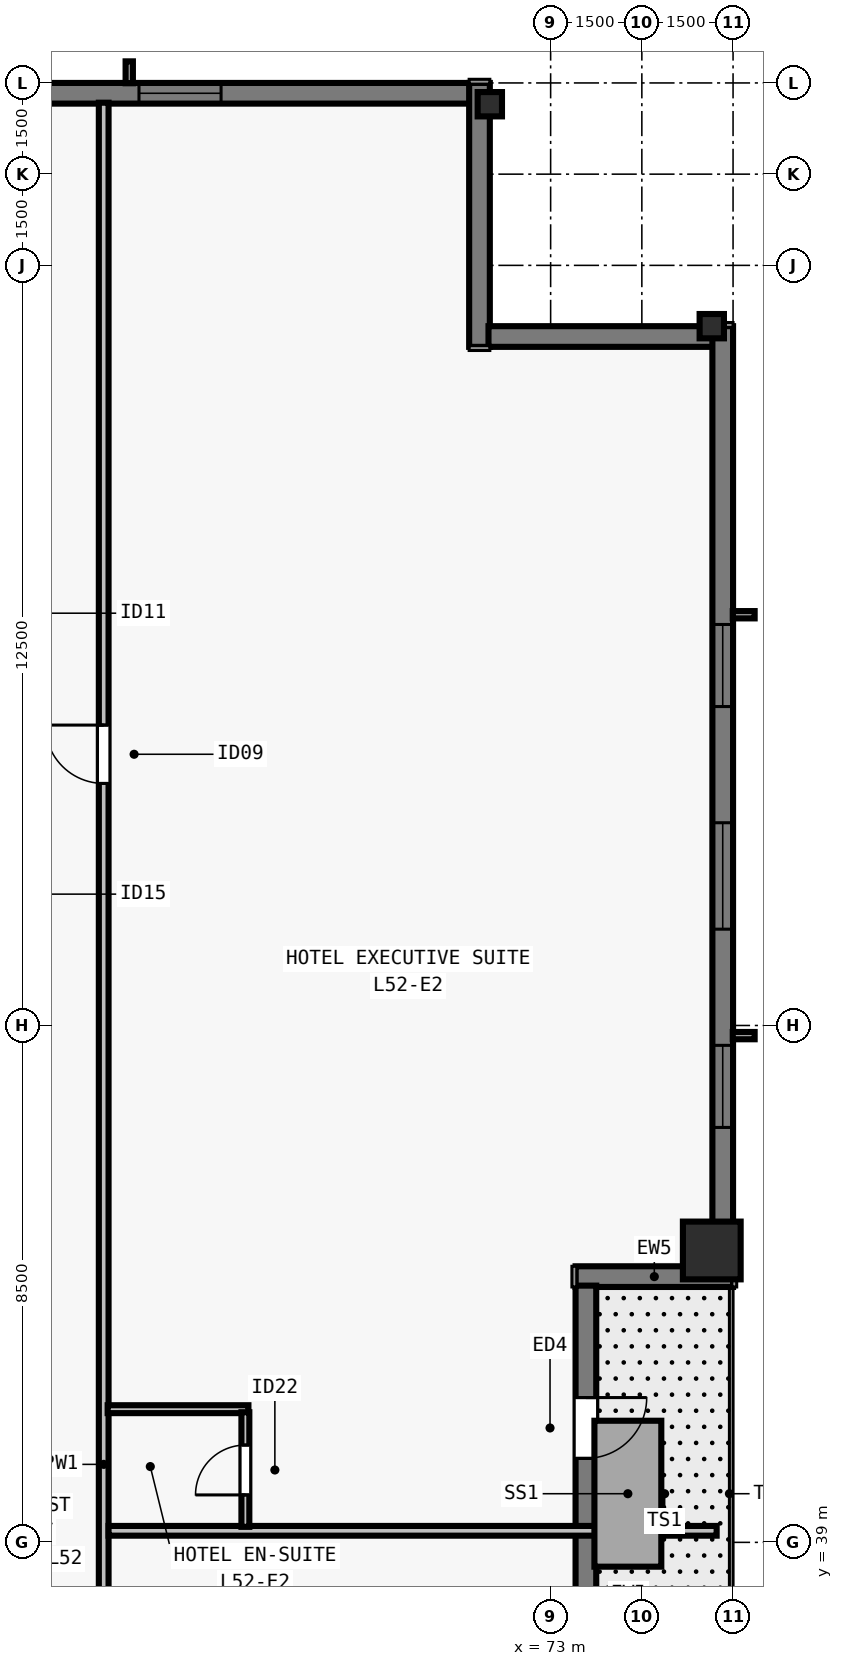
"""IFC4 building model, lengths in metres.
Left out: names, types, materials, properties, quantities, classifications, styles, units other than length and angle.
Written with IfcOpenShell. Run it as: python <this file> out.ifc"""

import sys

from ifc_helpers import new_model, si_unit, direction, frame, frame_2d, origin, origin_2d, place, context, subcontext, project, spatial, rectangle, i_section, extrude, element, fill, save


model = new_model("IFC4")
c1 = context("Model", 3, precision=1e-05, world=origin(), true_north=direction((0.0, 1.0)))
c2 = subcontext(c1, "Body", "Model", "MODEL_VIEW")
j1 = project(units=[si_unit("LENGTHUNIT", "METRE"), si_unit("PLANEANGLEUNIT", "RADIAN")], contexts=[c1])
p1 = place(None, origin())
s1 = spatial("IfcSite", under=j1, at=p1, CompositionType="ELEMENT")
p2 = place(p1, origin())
s2 = spatial("IfcBuilding", under=s1, at=p2, CompositionType="ELEMENT")
p3 = place(p2, frame((0.0, 0.0, 190.0)))
s3 = spatial("IfcBuildingStorey", under=s2, at=p3, CompositionType="ELEMENT", Elevation=190.0)
p4 = place(p3, frame((75.65, 43.8, 0.0), z_axis=(0.0, 0.0, 1.0), x_axis=(0.0, 1.0, 0.0)))
e1 = element("IfcColumn", 1, at=p4, inside=s3, PredefinedType="COLUMN", context=c2, shape_type="SweptSolid", body=[
    extrude(rectangle(XDim=0.95, YDim=0.95, at=origin_2d()), origin(), (0.0, 0.0, 1.0), 3.5),
])
for number, where, z_axis, x_axis in (
    (2, (75.65, 59.0, 0.0), (0.0, 0.0, 1.0), (0.0, 1.0, 0.0)),
    (3, (72.0, 62.65, 0.0), (0.0, 0.0, 1.0), (1.0, 0.0, 0.0)),
):
    element("IfcColumn", number, at=place(p3, frame(where, z_axis=z_axis, x_axis=x_axis)), inside=s3, PredefinedType="COLUMN", context=c2, shape_type="SweptSolid", body=[
        extrude(i_section(OverallWidth=0.4, OverallDepth=0.4, WebThickness=0.022, FlangeThickness=0.036, at=origin_2d()), origin(), (0.0, 0.0, 1.0), 3.5),
    ])
p5 = place(p3, frame((32.0, 62.83, 0.0), z_axis=(0.0, 0.0, 1.0), x_axis=(1.0, 0.0, 0.0)))
e4 = element("IfcWall", 4, at=p5, inside=s3, PredefinedType="SOLIDWALL", context=c2, shape_type="SweptSolid", body=[
    extrude(rectangle(XDim=39.682, YDim=0.34, at=frame_2d((19.841, 0.0))), origin(), (0.0, 0.0, 1.0), 3.24),
])
p6 = place(p5, frame((4.952, 0.0, 0.8)))
e5 = element("IfcOpeningElement", 5, at=p6, cuts=e4, PredefinedType="OPENING", context=c2, shape_type="SweptSolid", body=[
    extrude(rectangle(XDim=1.35, YDim=1.62, at=frame_2d((0.675, 0.81))), frame((0.0, 0.18, 0.0), z_axis=(0.0, -1.0, 0.0), x_axis=(1.0, 0.0, 0.0)), (0.0, 0.0, 1.0), 0.36),
])
p7 = place(p5, frame((12.059, 0.0, 0.8)))
e6 = element("IfcOpeningElement", 6, at=p7, cuts=e4, PredefinedType="OPENING", context=c2, shape_type="SweptSolid", body=[
    extrude(rectangle(XDim=1.35, YDim=1.62, at=frame_2d((0.675, 0.81))), frame((0.0, 0.18, 0.0), z_axis=(0.0, -1.0, 0.0), x_axis=(1.0, 0.0, 0.0)), (0.0, 0.0, 1.0), 0.36),
])
p8 = place(p5, frame((16.262, 0.0, 0.8)))
e7 = element("IfcOpeningElement", 7, at=p8, cuts=e4, PredefinedType="OPENING", context=c2, shape_type="SweptSolid", body=[
    extrude(rectangle(XDim=1.75, YDim=1.62, at=frame_2d((0.875, 0.81))), frame((0.0, 0.18, 0.0), z_axis=(0.0, -1.0, 0.0), x_axis=(1.0, 0.0, 0.0)), (0.0, 0.0, 1.0), 0.36),
])
p9 = place(p5, frame((19.166, 0.0, 0.8)))
e8 = element("IfcOpeningElement", 8, at=p9, cuts=e4, PredefinedType="OPENING", context=c2, shape_type="SweptSolid", body=[
    extrude(rectangle(XDim=1.35, YDim=1.62, at=frame_2d((0.675, 0.81))), frame((0.0, 0.18, 0.0), z_axis=(0.0, -1.0, 0.0), x_axis=(1.0, 0.0, 0.0)), (0.0, 0.0, 1.0), 0.36),
])
p10 = place(p5, frame((22.07, 0.0, 0.8)))
e9 = element("IfcOpeningElement", 9, at=p10, cuts=e4, PredefinedType="OPENING", context=c2, shape_type="SweptSolid", body=[
    extrude(rectangle(XDim=1.75, YDim=1.62, at=frame_2d((0.875, 0.81))), frame((0.0, 0.18, 0.0), z_axis=(0.0, -1.0, 0.0), x_axis=(1.0, 0.0, 0.0)), (0.0, 0.0, 1.0), 0.36),
])
p11 = place(p5, frame((26.273, 0.0, 0.8)))
e10 = element("IfcOpeningElement", 10, at=p11, cuts=e4, PredefinedType="OPENING", context=c2, shape_type="SweptSolid", body=[
    extrude(rectangle(XDim=1.35, YDim=1.62, at=frame_2d((0.675, 0.81))), frame((0.0, 0.18, 0.0), z_axis=(0.0, -1.0, 0.0), x_axis=(1.0, 0.0, 0.0)), (0.0, 0.0, 1.0), 0.36),
])
p12 = place(p5, frame((29.177, 0.0, 0.8)))
e11 = element("IfcOpeningElement", 11, at=p12, cuts=e4, PredefinedType="OPENING", context=c2, shape_type="SweptSolid", body=[
    extrude(rectangle(XDim=1.75, YDim=1.62, at=frame_2d((0.875, 0.81))), frame((0.0, 0.18, 0.0), z_axis=(0.0, -1.0, 0.0), x_axis=(1.0, 0.0, 0.0)), (0.0, 0.0, 1.0), 0.36),
])
p13 = place(p5, frame((34.23, 0.0, 0.8)))
e12 = element("IfcOpeningElement", 12, at=p13, cuts=e4, PredefinedType="OPENING", context=c2, shape_type="SweptSolid", body=[
    extrude(rectangle(XDim=1.35, YDim=1.62, at=frame_2d((0.675, 0.81))), frame((0.0, 0.18, 0.0), z_axis=(0.0, -1.0, 0.0), x_axis=(1.0, 0.0, 0.0)), (0.0, 0.0, 1.0), 0.36),
])
p14 = place(p3, frame((71.83, 63.0, 0.0), z_axis=(0.0, 0.0, 1.0), x_axis=(0.0, -1.0, 0.0)))
e13 = element("IfcWall", 13, at=p14, inside=s3, PredefinedType="SOLIDWALL", context=c2, shape_type="SweptSolid", body=[
    extrude(rectangle(XDim=4.34, YDim=0.34, at=frame_2d((2.17, 0.0))), origin(), (0.0, 0.0, 1.0), 3.24),
])
p15 = place(p3, frame((71.978, 58.83, 0.0), z_axis=(0.0, 0.0, 1.0), x_axis=(1.0, 0.0, 0.0)))
e14 = element("IfcWall", 14, at=p15, inside=s3, PredefinedType="SOLIDWALL", context=c2, shape_type="SweptSolid", body=[
    extrude(rectangle(XDim=3.704, YDim=0.34, at=frame_2d((1.852, 0.0))), origin(), (0.0, 0.0, 1.0), 3.24),
])
p16 = place(p3, frame((75.83, 59.0, 0.0), z_axis=(0.0, 0.0, 1.0), x_axis=(0.0, -1.0, 0.0)))
e15 = element("IfcWall", 15, at=p16, inside=s3, PredefinedType="SOLIDWALL", context=c2, shape_type="SweptSolid", body=[
    extrude(rectangle(XDim=15.482, YDim=0.34, at=frame_2d((7.741, 0.0))), origin(), (0.0, 0.0, 1.0), 3.24),
])
p17 = place(p16, frame((4.905, 0.0, 0.8)))
e16 = element("IfcOpeningElement", 16, at=p17, cuts=e15, PredefinedType="OPENING", context=c2, shape_type="SweptSolid", body=[
    extrude(rectangle(XDim=1.35, YDim=1.62, at=frame_2d((0.675, 0.81))), frame((0.0, 0.18, 0.0), z_axis=(0.0, -1.0, 0.0), x_axis=(1.0, 0.0, 0.0)), (0.0, 0.0, 1.0), 0.36),
])
p18 = place(p16, frame((8.166, 0.0, 0.8)))
e17 = element("IfcOpeningElement", 17, at=p18, cuts=e15, PredefinedType="OPENING", context=c2, shape_type="SweptSolid", body=[
    extrude(rectangle(XDim=1.75, YDim=1.62, at=frame_2d((0.875, 0.81))), frame((0.0, 0.18, 0.0), z_axis=(0.0, -1.0, 0.0), x_axis=(1.0, 0.0, 0.0)), (0.0, 0.0, 1.0), 0.36),
])
p19 = place(p16, frame((11.827, 0.0, 0.8)))
e18 = element("IfcOpeningElement", 18, at=p19, cuts=e15, PredefinedType="OPENING", context=c2, shape_type="SweptSolid", body=[
    extrude(rectangle(XDim=1.35, YDim=1.62, at=frame_2d((0.675, 0.81))), frame((0.0, 0.18, 0.0), z_axis=(0.0, -1.0, 0.0), x_axis=(1.0, 0.0, 0.0)), (0.0, 0.0, 1.0), 0.36),
])
p20 = place(p3, frame((76.0, 43.37, 0.0), z_axis=(0.0, 0.0, 1.0), x_axis=(-1.0, 0.0, 0.0)))
e19 = element("IfcWall", 19, at=p20, inside=s3, PredefinedType="SOLIDWALL", context=c2, shape_type="SweptSolid", body=[
    extrude(rectangle(XDim=2.59, YDim=0.34, at=frame_2d((1.295, 0.0))), origin(), (0.0, 0.0, 1.0), 3.24),
])
p21 = place(p3, frame((73.58, 43.222, 0.0), z_axis=(0.0, 0.0, 1.0), x_axis=(0.0, -1.0, 0.0)))
e20 = element("IfcWall", 20, at=p21, inside=s3, PredefinedType="SOLIDWALL", context=c2, shape_type="SweptSolid", body=[
    extrude(rectangle(XDim=7.162, YDim=0.34, at=frame_2d((3.581, 0.0))), origin(), (0.0, 0.0, 1.0), 3.24),
])
p22 = place(p21, frame((1.841, 0.0, 0.0)))
e21 = element("IfcOpeningElement", 21, at=p22, cuts=e20, PredefinedType="OPENING", context=c2, shape_type="SweptSolid", body=[
    extrude(rectangle(XDim=1.0, YDim=2.15, at=frame_2d((0.5, 1.075))), frame((0.0, 0.18, 0.0), z_axis=(0.0, -1.0, 0.0), x_axis=(1.0, 0.0, 0.0)), (0.0, 0.0, 1.0), 0.36),
])
p23 = place(p3, frame((65.65, 15.325, 0.0), z_axis=(0.0, 0.0, 1.0), x_axis=(0.0, 1.0, 0.0)))
e22 = element("IfcWall", 22, at=p23, inside=s3, PredefinedType="PARTITIONING", context=c2, shape_type="SweptSolid", body=[
    extrude(rectangle(XDim=47.35, YDim=0.16, at=frame_2d((23.675, 0.0))), origin(), (0.0, 0.0, 1.0), 2.515),
])
p24 = place(p23, frame((12.8, 0.0, 0.0)))
e23 = element("IfcOpeningElement", 23, at=p24, cuts=e22, PredefinedType="OPENING", context=c2, shape_type="SweptSolid", body=[
    extrude(rectangle(XDim=0.96, YDim=2.15, at=frame_2d((0.48, 1.075))), frame((0.0, 0.09, 0.0), z_axis=(0.0, -1.0, 0.0), x_axis=(1.0, 0.0, 0.0)), (0.0, 0.0, 1.0), 0.18),
])
p25 = place(p23, frame((36.155, 0.0, 0.0)))
e24 = element("IfcOpeningElement", 24, at=p25, cuts=e22, PredefinedType="OPENING", context=c2, shape_type="SweptSolid", body=[
    extrude(rectangle(XDim=0.96, YDim=2.15, at=frame_2d((0.48, 1.075))), frame((0.0, 0.09, 0.0), z_axis=(0.0, -1.0, 0.0), x_axis=(1.0, 0.0, 0.0)), (0.0, 0.0, 1.0), 0.18),
])
p26 = place(p3, frame((65.73, 39.19, 0.0), z_axis=(0.0, 0.0, 1.0), x_axis=(1.0, 0.0, 0.0)))
e25 = element("IfcWall", 25, at=p26, inside=s3, PredefinedType="PARTITIONING", context=c2, shape_type="SweptSolid", body=[
    extrude(rectangle(XDim=10.0, YDim=0.16, at=frame_2d((5.0, 0.0))), origin(), (0.0, 0.0, 1.0), 3.24),
])
p27 = place(p3, frame((65.715, 41.19, 0.0), z_axis=(0.0, 0.0, 1.0), x_axis=(1.0, 0.0, 0.0)))
e26 = element("IfcWall", 26, at=p27, inside=s3, PredefinedType="PLUMBINGWALL", context=c2, shape_type="SweptSolid", body=[
    extrude(rectangle(XDim=2.315, YDim=0.13, at=frame_2d((1.157, 0.0))), origin(), (0.0, 0.0, 1.0), 3.24),
])
p28 = place(p3, frame((67.98, 39.255, 0.0), z_axis=(0.0, 0.0, 1.0), x_axis=(0.0, 1.0, 0.0)))
e27 = element("IfcWall", 27, at=p28, inside=s3, PredefinedType="PLUMBINGWALL", context=c2, shape_type="SweptSolid", body=[
    extrude(rectangle(XDim=1.885, YDim=0.13, at=frame_2d((0.942, 0.0))), origin(), (0.0, 0.0, 1.0), 3.24),
])
p29 = place(p28, frame((0.525, 0.0, 0.0)))
e28 = element("IfcOpeningElement", 28, at=p29, cuts=e27, PredefinedType="OPENING", context=c2, shape_type="SweptSolid", body=[
    extrude(rectangle(XDim=0.82, YDim=2.1, at=frame_2d((0.41, 1.05))), frame((0.0, 0.075, 0.0), z_axis=(0.0, -1.0, 0.0), x_axis=(1.0, 0.0, 0.0)), (0.0, 0.0, 1.0), 0.15),
])
p30 = place(p13, origin())
e29 = element("IfcWindow", 29, at=p30, inside=s3, PartitioningType="SINGLE_PANEL", PredefinedType="WINDOW", context=c2, shape_type="SweptSolid", body=[
    extrude(rectangle(XDim=1.35, YDim=1.62, at=frame_2d((0.675, 0.81))), frame((0.0, -0.05, 0.0), z_axis=(0.0, -1.0, 0.0), x_axis=(1.0, 0.0, 0.0)), (0.0, 0.0, 1.0), 0.06),
])
fill(e12, e29)
p31 = place(p17, origin())
e30 = element("IfcWindow", 30, at=p31, inside=s3, PartitioningType="SINGLE_PANEL", PredefinedType="WINDOW", context=c2, shape_type="SweptSolid", body=[
    extrude(rectangle(XDim=1.35, YDim=1.62, at=frame_2d((0.675, 0.81))), frame((0.0, -0.05, 0.0), z_axis=(0.0, -1.0, 0.0), x_axis=(1.0, 0.0, 0.0)), (0.0, 0.0, 1.0), 0.06),
])
fill(e16, e30)
p32 = place(p18, origin())
e31 = element("IfcWindow", 31, at=p32, inside=s3, PartitioningType="SINGLE_PANEL", PredefinedType="WINDOW", context=c2, shape_type="SweptSolid", body=[
    extrude(rectangle(XDim=1.75, YDim=1.62, at=frame_2d((0.875, 0.81))), frame((0.0, -0.05, 0.0), z_axis=(0.0, -1.0, 0.0), x_axis=(1.0, 0.0, 0.0)), (0.0, 0.0, 1.0), 0.06),
])
fill(e17, e31)
p33 = place(p19, origin())
e32 = element("IfcWindow", 32, at=p33, inside=s3, PartitioningType="SINGLE_PANEL", PredefinedType="WINDOW", context=c2, shape_type="SweptSolid", body=[
    extrude(rectangle(XDim=1.35, YDim=1.62, at=frame_2d((0.675, 0.81))), frame((0.0, -0.05, 0.0), z_axis=(0.0, -1.0, 0.0), x_axis=(1.0, 0.0, 0.0)), (0.0, 0.0, 1.0), 0.06),
])
fill(e18, e32)
p34 = place(p22, origin())
e33 = element("IfcDoor", 33, at=p34, inside=s3, OperationType="SINGLE_SWING_LEFT", PredefinedType="DOOR", context=c2, shape_type="SweptSolid", body=[
    extrude(rectangle(XDim=1.0, YDim=2.15, at=frame_2d((0.5, 1.075))), frame((0.0, 0.025, 0.0), z_axis=(0.0, -1.0, 0.0), x_axis=(1.0, 0.0, 0.0)), (0.0, 0.0, 1.0), 0.05),
])
fill(e21, e33)
p35 = place(p29, origin())
e34 = element("IfcDoor", 34, at=p35, inside=s3, OperationType="SINGLE_SWING_LEFT", PredefinedType="DOOR", context=c2, shape_type="SweptSolid", body=[
    extrude(rectangle(XDim=0.82, YDim=2.1, at=frame_2d((0.41, 1.05))), frame((0.0, 0.025, 0.0), z_axis=(0.0, -1.0, 0.0), x_axis=(1.0, 0.0, 0.0)), (0.0, 0.0, 1.0), 0.05),
])
fill(e28, e34)
p36 = place(p25, origin())
e35 = element("IfcDoor", 35, at=p36, inside=s3, OperationType="SINGLE_SWING_RIGHT", PredefinedType="DOOR", context=c2, shape_type="SweptSolid", body=[
    extrude(rectangle(XDim=0.96, YDim=2.15, at=frame_2d((0.48, 1.075))), frame((0.0, 0.025, 0.0), z_axis=(0.0, -1.0, 0.0), x_axis=(1.0, 0.0, 0.0)), (0.0, 0.0, 1.0), 0.05),
])
fill(e24, e35)
save(model, sys.argv[1])
